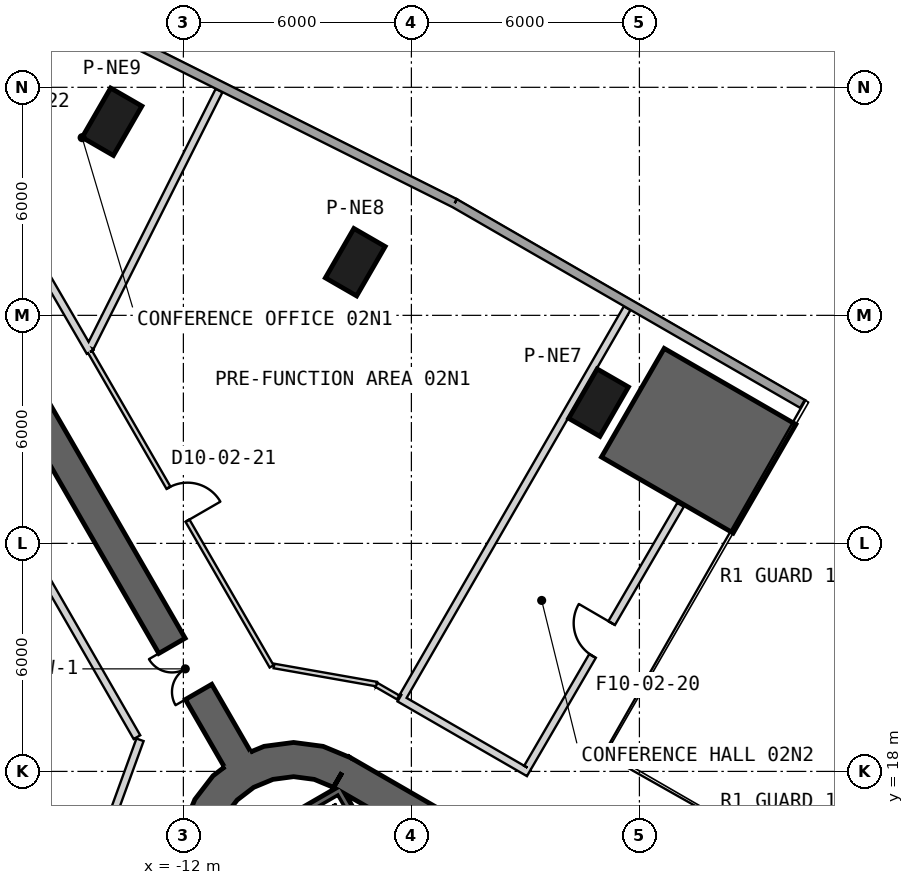
"""IFC4 building model, lengths in metres.
Left out: names, types, materials, properties, quantities, classifications, styles, units other than length and angle.
Written with IfcOpenShell. Run it as: python <this file> out.ifc"""

import sys

from ifc_helpers import new_model, si_unit, direction, frame, frame_2d, origin, origin_2d, place, context, subcontext, project, spatial, polyline, rectangle, outline, extrude, element, fill, save


model = new_model("IFC4")
c1 = context("Model", 3, precision=1e-05, world=origin(), true_north=direction((0.0, 1.0)))
c2 = subcontext(c1, "Body", "Model", "MODEL_VIEW")
j1 = project(units=[si_unit("LENGTHUNIT", "METRE"), si_unit("PLANEANGLEUNIT", "RADIAN")], contexts=[c1])
p1 = place(None, origin())
s1 = spatial("IfcSite", under=j1, at=p1, CompositionType="ELEMENT")
p2 = place(p1, origin())
s2 = spatial("IfcBuilding", under=s1, at=p2, CompositionType="ELEMENT")
p3 = place(p2, frame((0.0, 0.0, 15.5)))
s3 = spatial("IfcBuildingStorey", under=s2, at=p3, CompositionType="ELEMENT", Elevation=15.5)
for number, where, z_axis, x_axis in (
    (1, (-1.076, 27.703, 0.0), (0.0, 0.0, 1.0), (0.5, 0.866, 0.0)),
    (2, (-7.477, 31.398, 0.0), (0.0, 0.0, 1.0), (0.5, 0.866, 0.0)),
    (3, (-13.878, 35.094, 0.0), (0.0, 0.0, 1.0), (0.5, 0.866, 0.0)),
):
    element("IfcColumn", number, at=place(p3, frame(where, z_axis=z_axis, x_axis=x_axis)), inside=s3, PredefinedType="COLUMN", context=c2, shape_type="SweptSolid", body=[
        extrude(rectangle(XDim=1.5, YDim=0.95, at=origin_2d()), origin(), (0.0, 0.0, 1.0), 6.0),
    ])
p4 = place(p3, frame((19.475, 2.208, 0.0), z_axis=(0.0, 0.0, 1.0), x_axis=(-0.866028369851, 0.499994862586, 0.0)))
e4 = element("IfcWall", 4, at=p4, inside=s3, PredefinedType="SHEAR", context=c2, shape_type="SweptSolid", body=[
    extrude(rectangle(XDim=31.523, YDim=0.9, at=frame_2d((15.762, 0.0))), origin(), (0.0, 0.0, 1.0), 6.0),
])
p5 = place(p4, frame((7.062, 0.0, 0.0)))
e5 = element("IfcOpeningElement", 5, at=p5, cuts=e4, PredefinedType="OPENING", context=c2, shape_type="SweptSolid", body=[
    extrude(rectangle(XDim=1.2, YDim=2.4, at=frame_2d((0.6, 1.2))), frame((0.0, 0.46, 0.0), z_axis=(0.0, -1.0, 0.0), x_axis=(1.0, 0.0, 0.0)), (0.0, 0.0, 1.0), 0.92),
])
p6 = place(p4, frame((9.762, 0.0, 0.0)))
e6 = element("IfcOpeningElement", 6, at=p6, cuts=e4, PredefinedType="OPENING", context=c2, shape_type="SweptSolid", body=[
    extrude(rectangle(XDim=1.2, YDim=2.4, at=frame_2d((0.6, 1.2))), frame((0.0, 0.46, 0.0), z_axis=(0.0, -1.0, 0.0), x_axis=(1.0, 0.0, 0.0)), (0.0, 0.0, 1.0), 0.92),
])
p7 = place(p4, frame((12.462, 0.0, 0.0)))
e7 = element("IfcOpeningElement", 7, at=p7, cuts=e4, PredefinedType="OPENING", context=c2, shape_type="SweptSolid", body=[
    extrude(rectangle(XDim=1.2, YDim=2.4, at=frame_2d((0.6, 1.2))), frame((0.0, 0.46, 0.0), z_axis=(0.0, -1.0, 0.0), x_axis=(1.0, 0.0, 0.0)), (0.0, 0.0, 1.0), 0.92),
])
p8 = place(p4, frame((15.162, 0.0, 0.0)))
e8 = element("IfcOpeningElement", 8, at=p8, cuts=e4, PredefinedType="OPENING", context=c2, shape_type="SweptSolid", body=[
    extrude(rectangle(XDim=1.2, YDim=2.4, at=frame_2d((0.6, 1.2))), frame((0.0, 0.46, 0.0), z_axis=(0.0, -1.0, 0.0), x_axis=(1.0, 0.0, 0.0)), (0.0, 0.0, 1.0), 0.92),
])
p9 = place(p4, frame((17.862, 0.0, 0.0)))
e9 = element("IfcOpeningElement", 9, at=p9, cuts=e4, PredefinedType="OPENING", context=c2, shape_type="SweptSolid", body=[
    extrude(rectangle(XDim=1.2, YDim=2.4, at=frame_2d((0.6, 1.2))), frame((0.0, 0.46, 0.0), z_axis=(0.0, -1.0, 0.0), x_axis=(1.0, 0.0, 0.0)), (0.0, 0.0, 1.0), 0.92),
])
p10 = place(p4, frame((20.562, 0.0, 0.0)))
e10 = element("IfcOpeningElement", 10, at=p10, cuts=e4, PredefinedType="OPENING", context=c2, shape_type="SweptSolid", body=[
    extrude(rectangle(XDim=1.2, YDim=2.4, at=frame_2d((0.6, 1.2))), frame((0.0, 0.46, 0.0), z_axis=(0.0, -1.0, 0.0), x_axis=(1.0, 0.0, 0.0)), (0.0, 0.0, 1.0), 0.92),
])
p11 = place(p4, frame((23.262, 0.0, 0.0)))
e11 = element("IfcOpeningElement", 11, at=p11, cuts=e4, PredefinedType="OPENING", context=c2, shape_type="SweptSolid", body=[
    extrude(rectangle(XDim=1.2, YDim=2.4, at=frame_2d((0.6, 1.2))), frame((0.0, 0.46, 0.0), z_axis=(0.0, -1.0, 0.0), x_axis=(1.0, 0.0, 0.0)), (0.0, 0.0, 1.0), 0.92),
])
p12 = place(p4, frame((3.612, 0.0, 0.0)))
e12 = element("IfcOpeningElement", 12, at=p12, cuts=e4, PredefinedType="OPENING", context=c2, shape_type="SweptSolid", body=[
    extrude(rectangle(XDim=1.2, YDim=2.4, at=frame_2d((0.6, 1.2))), frame((0.0, 0.46, 0.0), z_axis=(0.0, -1.0, 0.0), x_axis=(1.0, 0.0, 0.0)), (0.0, 0.0, 1.0), 0.92),
])
p13 = place(p4, frame((26.712, 0.0, 0.0)))
e13 = element("IfcOpeningElement", 13, at=p13, cuts=e4, PredefinedType="OPENING", context=c2, shape_type="SweptSolid", body=[
    extrude(rectangle(XDim=1.2, YDim=2.4, at=frame_2d((0.6, 1.2))), frame((0.0, 0.46, 0.0), z_axis=(0.0, -1.0, 0.0), x_axis=(1.0, 0.0, 0.0)), (0.0, 0.0, 1.0), 0.92),
])
p14 = place(p3, origin())
e14 = element("IfcWall", 14, at=p14, inside=s3, PredefinedType="SHEAR", context=c2, shape_type="SweptSolid", body=[
    extrude(outline(polyline([(-7.6, 18.36), (-8.323, 18.659), (-9.1, 18.762), (-9.876, 18.659), (-10.6, 18.36), (-11.221, 17.883), (-11.698, 17.262), (-11.998, 16.538), (-12.1, 15.762), (-11.2, 15.762), (-11.128, 16.305), (-10.919, 16.812), (-10.585, 17.247), (-10.15, 17.58), (-9.644, 17.79), (-9.1, 17.862), (-8.556, 17.79), (-8.05, 17.58), (-7.6, 18.36)])), origin(), (0.0, 0.0, 1.0), 6.0),
])
p15 = place(p3, frame((-10.575, 18.316, 0.0), z_axis=(0.0, 0.0, 1.0), x_axis=(-0.499996575515, 0.866027380903, 0.0)))
e15 = element("IfcWall", 15, at=p15, inside=s3, PredefinedType="SHEAR", context=c2, shape_type="SweptSolid", body=[
    extrude(rectangle(XDim=13.954, YDim=0.8, at=frame_2d((6.977, 0.0))), origin(), (0.0, 0.0, 1.0), 6.0),
])
p16 = place(p15, frame((2.05, 0.0, 0.0)))
e16 = element("IfcOpeningElement", 16, at=p16, cuts=e15, PredefinedType="OPENING", context=c2, shape_type="SweptSolid", body=[
    extrude(rectangle(XDim=1.4, YDim=2.4, at=frame_2d((0.7, 1.2))), frame((0.0, 0.41, 0.0), z_axis=(0.0, -1.0, 0.0), x_axis=(1.0, 0.0, 0.0)), (0.0, 0.0, 1.0), 0.82),
])
p17 = place(p3, origin())
e17 = element("IfcWall", 17, at=p17, inside=s3, PredefinedType="SHEAR", context=c2, shape_type="SweptSolid", body=[
    extrude(outline(polyline([(4.116, 27.13), (0.652, 29.13), (-0.998, 26.272), (2.467, 24.272), (4.116, 27.13)])), origin(), (0.0, 0.0, 1.0), 6.0),
])
p18 = place(p3, frame((4.29, 27.67, 0.0), z_axis=(0.0, 0.0, 1.0), x_axis=(-0.866062075984, 0.499936476508, 0.0)))
e18 = element("IfcWall", 18, at=p18, inside=s3, PredefinedType="SOLIDWALL", context=c2, shape_type="SweptSolid", body=[
    extrude(rectangle(XDim=10.566, YDim=0.24, at=frame_2d((5.283, 0.0))), origin(), (0.0, 0.0, 1.0), 5.7),
])
p19 = place(p3, frame((-4.861, 32.952, 0.0), z_axis=(0.0, 0.0, 1.0), x_axis=(-0.894285628533, 0.447496608478, 0.0)))
e19 = element("IfcWall", 19, at=p19, inside=s3, PredefinedType="SOLIDWALL", context=c2, shape_type="SweptSolid", body=[
    extrude(rectangle(XDim=13.801, YDim=0.24, at=frame_2d((6.901, 0.0))), origin(), (0.0, 0.0, 1.0), 5.7),
])
p20 = place(p3, frame((-7.818, 17.541, -0.3), z_axis=(0.0, 0.0, 1.0), x_axis=(-0.866088799389, -0.499890179513, 0.0)))
e20 = element("IfcWall", 20, at=p20, inside=s3, PredefinedType="SHEAR", context=c2, shape_type="SweptSolid", body=[
    extrude(rectangle(XDim=1.89, YDim=0.2, at=frame_2d((0.945, 0.0))), origin(), (0.0, 0.0, 1.0), 6.0),
])
p21 = place(p3, frame((-7.854, 17.405, -0.3), z_axis=(0.0, 0.0, 1.0), x_axis=(0.499997992926, -0.866026562566, 0.0)))
e21 = element("IfcWall", 21, at=p21, inside=s3, PredefinedType="SHEAR", context=c2, shape_type="SweptSolid", body=[
    extrude(rectangle(XDim=7.9, YDim=0.2, at=frame_2d((3.95, 0.0))), origin(), (0.0, 0.0, 1.0), 6.0),
])
p22 = place(p3, frame((-13.141, 18.831, 0.0), z_axis=(0.0, 0.0, 1.0), x_axis=(-0.34184444978, -0.939756549408, 0.0)))
e22 = element("IfcWall", 22, at=p22, inside=s3, PredefinedType="PARTITIONING", context=c2, shape_type="SweptSolid", body=[
    extrude(rectangle(XDim=2.707, YDim=0.2, at=frame_2d((1.354, 0.0))), origin(), (0.0, 0.0, 1.0), 4.78),
])
p23 = place(p3, frame((-13.222, 18.901, 0.0), z_axis=(0.0, 0.0, 1.0), x_axis=(-0.498838585436, 0.866694909227, 0.0)))
e23 = element("IfcWall", 23, at=p23, inside=s3, PredefinedType="PARTITIONING", context=c2, shape_type="SweptSolid", body=[
    extrude(rectangle(XDim=21.368, YDim=0.2, at=frame_2d((10.684, 0.0))), origin(), (0.0, 0.0, 1.0), 5.7),
])
p24 = place(p23, frame((10.134, 0.0, 0.0)))
e24 = element("IfcOpeningElement", 24, at=p24, cuts=e23, PredefinedType="OPENING", context=c2, shape_type="SweptSolid", body=[
    extrude(rectangle(XDim=1.0, YDim=2.1, at=frame_2d((0.5, 1.05))), frame((0.0, 0.11, 0.0), z_axis=(0.0, -1.0, 0.0), x_axis=(1.0, 0.0, 0.0)), (0.0, 0.0, 1.0), 0.22),
])
p25 = place(p3, frame((-2.909, 17.962, 0.0), z_axis=(0.0, 0.0, 1.0), x_axis=(-0.866156637233, 0.499772628079, 0.0)))
e25 = element("IfcWall", 25, at=p25, inside=s3, PredefinedType="PARTITIONING", context=c2, shape_type="SweptSolid", body=[
    extrude(rectangle(XDim=3.931, YDim=0.2, at=frame_2d((1.966, 0.0))), origin(), (0.0, 0.0, 1.0), 4.88),
])
p26 = place(p3, frame((-2.945, 18.098, 0.0), z_axis=(0.0, 0.0, 1.0), x_axis=(0.503235430028, 0.864149351654, 0.0)))
e26 = element("IfcWall", 26, at=p26, inside=s3, PredefinedType="PARTITIONING", context=c2, shape_type="SweptSolid", body=[
    extrude(rectangle(XDim=8.002, YDim=0.2, at=frame_2d((4.001, 0.0))), origin(), (0.0, 0.0, 1.0), 5.17),
])
p27 = place(p26, frame((3.402, 0.0, 0.0)))
e27 = element("IfcOpeningElement", 27, at=p27, cuts=e26, PredefinedType="OPENING", context=c2, shape_type="SweptSolid", body=[
    extrude(rectangle(XDim=1.0, YDim=2.1, at=frame_2d((0.5, 1.05))), frame((0.0, 0.11, 0.0), z_axis=(0.0, -1.0, 0.0), x_axis=(1.0, 0.0, 0.0)), (0.0, 0.0, 1.0), 0.22),
])
p28 = place(p3, frame((-14.455, 29.037, 0.0), z_axis=(0.0, 0.0, 1.0), x_axis=(0.500000422144, -0.866025160059, 0.0)))
e28 = element("IfcWall", 28, at=p28, inside=s3, PredefinedType="PARTITIONING", context=c2, shape_type="SweptSolid", body=[
    extrude(rectangle(XDim=9.554, YDim=0.12, at=frame_2d((4.777, 0.0))), origin(), (0.0, 0.0, 1.0), 5.7),
])
p29 = place(p28, frame((4.127, 0.0, 0.0)))
e29 = element("IfcOpeningElement", 29, at=p29, cuts=e28, PredefinedType="OPENING", context=c2, shape_type="SweptSolid", body=[
    extrude(rectangle(XDim=1.0, YDim=2.1, at=frame_2d((0.5, 1.05))), frame((0.0, 0.07, 0.0), z_axis=(0.0, -1.0, 0.0), x_axis=(1.0, 0.0, 0.0)), (0.0, 0.0, 1.0), 0.14),
])
p30 = place(p3, frame((-6.915, 20.297, 0.0), z_axis=(0.0, 0.0, 1.0), x_axis=(-0.98477728301, 0.173820893068, 0.0)))
e30 = element("IfcWall", 30, at=p30, inside=s3, PredefinedType="PARTITIONING", context=c2, shape_type="SweptSolid", body=[
    extrude(rectangle(XDim=2.742, YDim=0.12, at=frame_2d((1.371, 0.0))), origin(), (0.0, 0.0, 1.0), 4.78),
])
p31 = place(p3, frame((-6.349, 19.947, 0.0), z_axis=(0.0, 0.0, 1.0), x_axis=(-0.865964461276, 0.500105540669, 0.0)))
e31 = element("IfcWall", 31, at=p31, inside=s3, PredefinedType="PARTITIONING", context=c2, shape_type="SweptSolid", body=[
    extrude(rectangle(XDim=0.662, YDim=0.12, at=frame_2d((0.331, 0.0))), origin(), (0.0, 0.0, 1.0), 5.7),
])
p32 = place(p3, frame((-20.466, 39.392, 0.0), z_axis=(0.0, 0.0, 1.0), x_axis=(0.502069597937, -0.86482721906, 0.0)))
e32 = element("IfcWall", 32, at=p32, inside=s3, PredefinedType="PARTITIONING", context=c2, shape_type="SweptSolid", body=[
    extrude(rectangle(XDim=11.973, YDim=0.2, at=frame_2d((5.986, 0.0))), origin(), (0.0, 0.0, 1.0), 5.7),
])
p33 = place(p32, frame((5.267, 0.0, 0.0)))
e33 = element("IfcOpeningElement", 33, at=p33, cuts=e32, PredefinedType="OPENING", context=c2, shape_type="SweptSolid", body=[
    extrude(rectangle(XDim=1.0, YDim=2.1, at=frame_2d((0.5, 1.05))), frame((0.0, 0.11, 0.0), z_axis=(0.0, -1.0, 0.0), x_axis=(1.0, 0.0, 0.0)), (0.0, 0.0, 1.0), 0.22),
])
p34 = place(p3, frame((-6.212, 19.983, 0.0), z_axis=(0.0, 0.0, 1.0), x_axis=(0.499938894435, 0.866060680225, 0.0)))
e34 = element("IfcWall", 34, at=p34, inside=s3, PredefinedType="PARTITIONING", context=c2, shape_type="SweptSolid", body=[
    extrude(rectangle(XDim=11.782, YDim=0.2, at=frame_2d((5.891, 0.0))), origin(), (0.0, 0.0, 1.0), 4.88),
])
p35 = place(p3, frame((-11.061, 35.915, 0.0), z_axis=(0.0, 0.0, 1.0), x_axis=(-0.448736604458, -0.893664064299, 0.0)))
e35 = element("IfcWall", 35, at=p35, inside=s3, PredefinedType="PARTITIONING", context=c2, shape_type="SweptSolid", body=[
    extrude(rectangle(XDim=7.563, YDim=0.2, at=frame_2d((3.781, 0.0))), origin(), (0.0, 0.0, 1.0), 4.78),
])
p36 = place(p27, origin())
e36 = element("IfcDoor", 36, at=p36, inside=s3, OperationType="SINGLE_SWING_RIGHT", PredefinedType="USERDEFINED", context=c2, shape_type="SweptSolid", body=[
    extrude(rectangle(XDim=1.0, YDim=2.1, at=frame_2d((0.5, 1.05))), frame((0.0, 0.025, 0.0), z_axis=(0.0, -1.0, 0.0), x_axis=(1.0, 0.0, 0.0)), (0.0, 0.0, 1.0), 0.05),
])
fill(e27, e36)
p37 = place(p29, origin())
e37 = element("IfcDoor", 37, at=p37, inside=s3, OperationType="SINGLE_SWING_RIGHT", PredefinedType="NOTDEFINED", context=c2, shape_type="SweptSolid", body=[
    extrude(rectangle(XDim=1.0, YDim=2.1, at=frame_2d((0.5, 1.05))), frame((0.0, 0.025, 0.0), z_axis=(0.0, -1.0, 0.0), x_axis=(1.0, 0.0, 0.0)), (0.0, 0.0, 1.0), 0.05),
])
fill(e29, e37)
p38 = place(p16, origin())
e38 = element("IfcDoor", 38, at=p38, inside=s3, OperationType="DOUBLE_DOOR_SINGLE_SWING", PredefinedType="NOTDEFINED", context=c2, shape_type="SweptSolid", body=[
    extrude(rectangle(XDim=1.4, YDim=2.4, at=frame_2d((0.7, 1.2))), frame((0.0, 0.025, 0.0), z_axis=(0.0, -1.0, 0.0), x_axis=(1.0, 0.0, 0.0)), (0.0, 0.0, 1.0), 0.05),
])
fill(e16, e38)
save(model, sys.argv[1])
